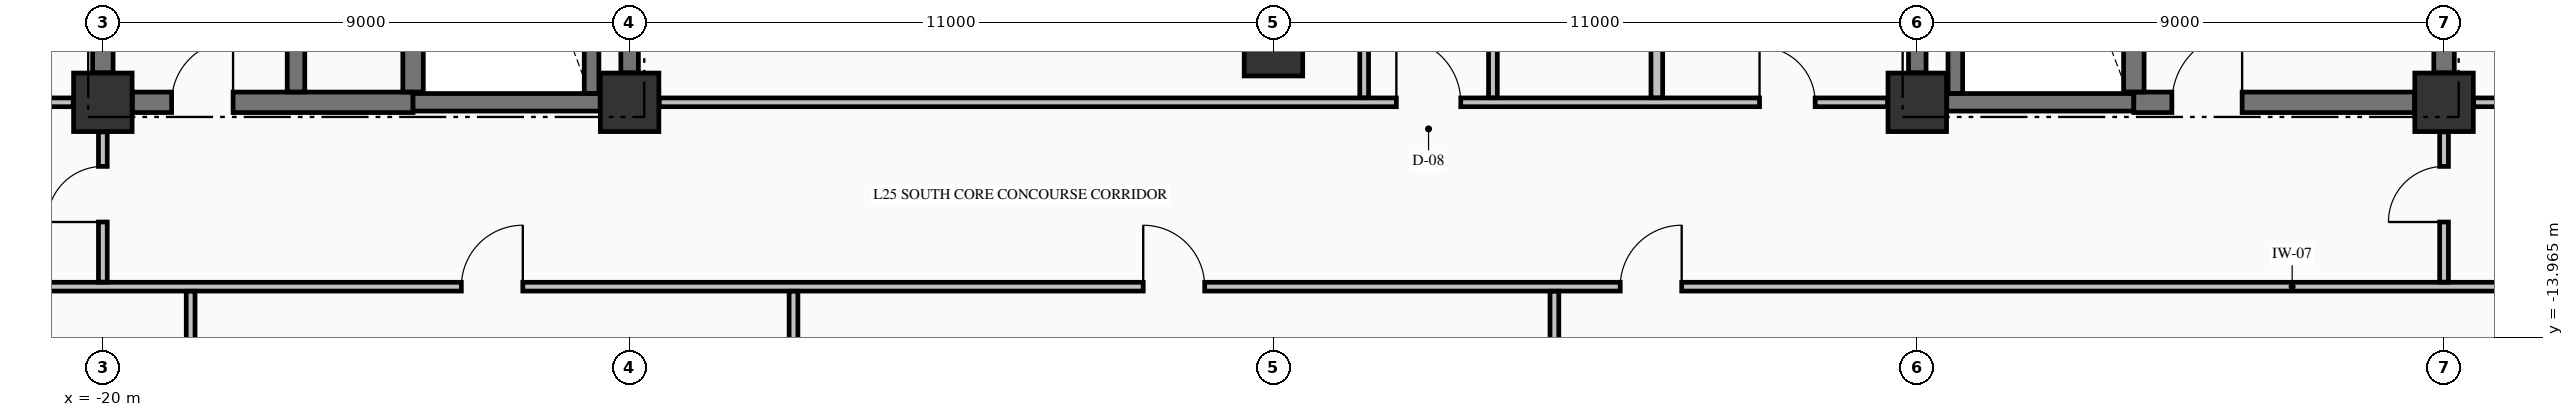
"""IFC4 building model, lengths in metres.
Left out: names, types, materials, properties, quantities, classifications, styles, units other than length and angle.
Written with IfcOpenShell. Run it as: python <this file> out.ifc"""

import sys

from ifc_helpers import new_model, si_unit, direction, frame, frame_2d, origin, origin_2d, place, context, subcontext, project, spatial, rectangle, extrude, element, fill, save


model = new_model("IFC4")
c1 = context("Model", 3, precision=1e-05, world=origin(), true_north=direction((0.0, 1.0)))
c2 = subcontext(c1, "Body", "Model", "MODEL_VIEW")
j1 = project(units=[si_unit("LENGTHUNIT", "METRE"), si_unit("PLANEANGLEUNIT", "RADIAN")], contexts=[c1])
p1 = place(None, origin())
s1 = spatial("IfcSite", under=j1, at=p1, CompositionType="ELEMENT")
p2 = place(p1, origin())
s2 = spatial("IfcBuilding", under=s1, at=p2, CompositionType="ELEMENT")
p3 = place(p2, frame((0.0, 0.0, 102.07)))
s3 = spatial("IfcBuildingStorey", under=s2, at=p3, CompositionType="ELEMENT", Elevation=102.07)
for number, where, z_axis, x_axis in (
    (1, (-20.0, -9.95, -0.25), (0.0, 0.0, 1.0), (1.0, 0.0, 0.0)),
    (2, (-11.0, -9.95, -0.25), (0.0, 0.0, 1.0), (1.0, 0.0, 0.0)),
    (3, (11.0, -9.95, -0.25), (0.0, 0.0, 1.0), (1.0, 0.0, 0.0)),
    (4, (20.0, -9.95, -0.25), (0.0, 0.0, 1.0), (1.0, 0.0, 0.0)),
    (5, (0.0, -9.0, -0.25), (0.0, 0.0, 1.0), (1.0, 0.0, 0.0)),
):
    element("IfcColumn", number, at=place(p3, frame(where, z_axis=z_axis, x_axis=x_axis)), inside=s3, PredefinedType="COLUMN", context=c2, shape_type="SweptSolid", body=[
        extrude(rectangle(XDim=1.0, YDim=1.0, at=origin_2d()), origin(), (0.0, 0.0, 1.0), 3.57),
    ])
p4 = place(p3, frame((-19.496, -9.95, 0.0), z_axis=(0.0, 0.0, 1.0), x_axis=(1.0, 0.0, 0.0)))
e6 = element("IfcWall", 6, at=p4, inside=s3, PredefinedType="SHEAR", context=c2, shape_type="SweptSolid", body=[
    extrude(rectangle(XDim=4.796, YDim=0.35, at=frame_2d((2.398, 0.0))), origin(), (0.0, 0.0, 1.0), 3.32),
])
p5 = place(p4, frame((0.671, 0.0, 0.0)))
e7 = element("IfcOpeningElement", 7, at=p5, cuts=e6, PredefinedType="OPENING", context=c2, shape_type="SweptSolid", body=[
    extrude(rectangle(XDim=1.05, YDim=2.15, at=frame_2d((0.525, 1.075))), frame((0.0, 0.185, 0.0), z_axis=(0.0, -1.0, 0.0), x_axis=(1.0, 0.0, 0.0)), (0.0, 0.0, 1.0), 0.37),
])
for number, where, z_axis, x_axis in (
    (8, (-14.7, -9.95, 0.0), (0.0, 0.0, 1.0), (1.0, 0.0, 0.0)),
    (9, (11.504, -9.95, 0.0), (0.0, 0.0, 1.0), (1.0, 0.0, 0.0)),
):
    element("IfcWall", number, at=place(p3, frame(where, z_axis=z_axis, x_axis=x_axis)), inside=s3, PredefinedType="SHEAR", context=c2, shape_type="SweptSolid", body=[
        extrude(rectangle(XDim=3.196, YDim=0.3, at=frame_2d((1.598, 0.0))), origin(), (0.0, 0.0, 1.0), 3.32),
    ])
p6 = place(p3, frame((14.7, -9.95, 0.0), z_axis=(0.0, 0.0, 1.0), x_axis=(1.0, 0.0, 0.0)))
e10 = element("IfcWall", 10, at=p6, inside=s3, PredefinedType="SHEAR", context=c2, shape_type="SweptSolid", body=[
    extrude(rectangle(XDim=4.796, YDim=0.35, at=frame_2d((2.398, 0.0))), origin(), (0.0, 0.0, 1.0), 3.32),
])
p7 = place(p6, frame((0.65, 0.0, 0.0)))
e11 = element("IfcOpeningElement", 11, at=p7, cuts=e10, PredefinedType="OPENING", context=c2, shape_type="SweptSolid", body=[
    extrude(rectangle(XDim=1.2, YDim=2.15, at=frame_2d((0.6, 1.075))), frame((0.0, 0.185, 0.0), z_axis=(0.0, -1.0, 0.0), x_axis=(1.0, 0.0, 0.0)), (0.0, 0.0, 1.0), 0.37),
])
p8 = place(p3, frame((-22.835, -13.1, 0.0), z_axis=(0.0, 0.0, 1.0), x_axis=(1.0, 0.0, 0.0)))
e12 = element("IfcWall", 12, at=p8, inside=s3, PredefinedType="PARTITIONING", context=c2, shape_type="SweptSolid", body=[
    extrude(rectangle(XDim=50.67, YDim=0.15, at=frame_2d((25.335, 0.0))), origin(), (0.0, 0.0, 1.0), 3.32),
])
p9 = place(p8, frame((8.96, 0.0, 0.0)))
e13 = element("IfcOpeningElement", 13, at=p9, cuts=e12, PredefinedType="OPENING", context=c2, shape_type="SweptSolid", body=[
    extrude(rectangle(XDim=1.05, YDim=2.15, at=frame_2d((0.525, 1.075))), frame((0.0, 0.085, 0.0), z_axis=(0.0, -1.0, 0.0), x_axis=(1.0, 0.0, 0.0)), (0.0, 0.0, 1.0), 0.17),
])
p10 = place(p8, frame((20.61, 0.0, 0.0)))
e14 = element("IfcOpeningElement", 14, at=p10, cuts=e12, PredefinedType="OPENING", context=c2, shape_type="SweptSolid", body=[
    extrude(rectangle(XDim=1.05, YDim=2.15, at=frame_2d((0.525, 1.075))), frame((0.0, 0.085, 0.0), z_axis=(0.0, -1.0, 0.0), x_axis=(1.0, 0.0, 0.0)), (0.0, 0.0, 1.0), 0.17),
])
p11 = place(p8, frame((28.76, 0.0, 0.0)))
e15 = element("IfcOpeningElement", 15, at=p11, cuts=e12, PredefinedType="OPENING", context=c2, shape_type="SweptSolid", body=[
    extrude(rectangle(XDim=1.05, YDim=2.15, at=frame_2d((0.525, 1.075))), frame((0.0, 0.085, 0.0), z_axis=(0.0, -1.0, 0.0), x_axis=(1.0, 0.0, 0.0)), (0.0, 0.0, 1.0), 0.17),
])
p12 = place(p3, frame((-22.835, -9.95, 0.0), z_axis=(0.0, 0.0, 1.0), x_axis=(1.0, 0.0, 0.0)))
e16 = element("IfcWall", 16, at=p12, inside=s3, PredefinedType="PARTITIONING", context=c2, shape_type="SweptSolid", body=[
    extrude(rectangle(XDim=2.329, YDim=0.15, at=frame_2d((1.165, 0.0))), origin(), (0.0, 0.0, 1.0), 3.32),
])
p13 = place(p12, frame((0.835, 0.0, 0.0)))
e17 = element("IfcOpeningElement", 17, at=p13, cuts=e16, PredefinedType="OPENING", context=c2, shape_type="SweptSolid", body=[
    extrude(rectangle(XDim=1.0, YDim=2.15, at=frame_2d((0.5, 1.075))), frame((0.0, 0.085, 0.0), z_axis=(0.0, -1.0, 0.0), x_axis=(1.0, 0.0, 0.0)), (0.0, 0.0, 1.0), 0.17),
])
p14 = place(p3, frame((-10.494, -9.95, 0.0), z_axis=(0.0, 0.0, 1.0), x_axis=(1.0, 0.0, 0.0)))
e18 = element("IfcWall", 18, at=p14, inside=s3, PredefinedType="PARTITIONING", context=c2, shape_type="SweptSolid", body=[
    extrude(rectangle(XDim=20.988, YDim=0.15, at=frame_2d((10.494, 0.0))), origin(), (0.0, 0.0, 1.0), 3.32),
])
p15 = place(p14, frame((12.594, 0.0, 0.0)))
e19 = element("IfcOpeningElement", 19, at=p15, cuts=e18, PredefinedType="OPENING", context=c2, shape_type="SweptSolid", body=[
    extrude(rectangle(XDim=1.1, YDim=2.15, at=frame_2d((0.55, 1.075))), frame((0.0, 0.085, 0.0), z_axis=(0.0, -1.0, 0.0), x_axis=(1.0, 0.0, 0.0)), (0.0, 0.0, 1.0), 0.17),
])
p16 = place(p14, frame((18.799, 0.0, 0.0)))
e20 = element("IfcOpeningElement", 20, at=p16, cuts=e18, PredefinedType="OPENING", context=c2, shape_type="SweptSolid", body=[
    extrude(rectangle(XDim=0.95, YDim=2.15, at=frame_2d((0.475, 1.075))), frame((0.0, 0.085, 0.0), z_axis=(0.0, -1.0, 0.0), x_axis=(1.0, 0.0, 0.0)), (0.0, 0.0, 1.0), 0.17),
])
p17 = place(p3, frame((20.506, -9.95, 0.0), z_axis=(0.0, 0.0, 1.0), x_axis=(1.0, 0.0, 0.0)))
e21 = element("IfcWall", 21, at=p17, inside=s3, PredefinedType="PARTITIONING", context=c2, shape_type="SweptSolid", body=[
    extrude(rectangle(XDim=7.329, YDim=0.15, at=frame_2d((3.665, 0.0))), origin(), (0.0, 0.0, 1.0), 3.32),
])
p18 = place(p17, frame((3.019, 0.0, 0.0)))
e22 = element("IfcOpeningElement", 22, at=p18, cuts=e21, PredefinedType="OPENING", context=c2, shape_type="SweptSolid", body=[
    extrude(rectangle(XDim=0.95, YDim=2.15, at=frame_2d((0.475, 1.075))), frame((0.0, 0.085, 0.0), z_axis=(0.0, -1.0, 0.0), x_axis=(1.0, 0.0, 0.0)), (0.0, 0.0, 1.0), 0.17),
])
p19 = place(p3, frame((-20.0, -9.446, 0.0), z_axis=(0.0, 0.0, 1.0), x_axis=(0.0, 1.0, 0.0)))
e23 = element("IfcWall", 23, at=p19, inside=s3, PredefinedType="SHEAR", context=c2, shape_type="SweptSolid", body=[
    extrude(rectangle(XDim=8.942, YDim=0.35, at=frame_2d((4.471, 0.0))), origin(), (0.0, 0.0, 1.0), 3.32),
])
p20 = place(p3, frame((-16.7, -9.773, 0.0), z_axis=(0.0, 0.0, 1.0), x_axis=(0.0, 1.0, 0.0)))
e24 = element("IfcWall", 24, at=p20, inside=s3, PredefinedType="SHEAR", context=c2, shape_type="SweptSolid", body=[
    extrude(rectangle(XDim=9.371, YDim=0.3, at=frame_2d((4.686, 0.0))), origin(), (0.0, 0.0, 1.0), 3.32),
])
p21 = place(p3, frame((-14.7, -9.773, 0.0), z_axis=(0.0, 0.0, 1.0), x_axis=(0.0, 1.0, 0.0)))
e25 = element("IfcWall", 25, at=p21, inside=s3, PredefinedType="SHEAR", context=c2, shape_type="SweptSolid", body=[
    extrude(rectangle(XDim=9.371, YDim=0.35, at=frame_2d((4.686, 0.0))), origin(), (0.0, 0.0, 1.0), 3.32),
])
p22 = place(p3, frame((-11.65, -9.798, 0.0), z_axis=(0.0, 0.0, 1.0), x_axis=(0.0, 1.0, 0.0)))
e26 = element("IfcWall", 26, at=p22, inside=s3, PredefinedType="SOLIDWALL", context=c2, shape_type="SweptSolid", body=[
    extrude(rectangle(XDim=9.396, YDim=0.25, at=frame_2d((4.698, 0.0))), origin(), (0.0, 0.0, 1.0), 3.32),
])
for number, where, z_axis, x_axis in (
    (27, (-11.0, -9.446, 0.0), (0.0, 0.0, 1.0), (0.0, 1.0, 0.0)),
    (28, (11.0, -9.446, 0.0), (0.0, 0.0, 1.0), (0.0, 1.0, 0.0)),
):
    element("IfcWall", number, at=place(p3, frame(where, z_axis=z_axis, x_axis=x_axis)), inside=s3, PredefinedType="SHEAR", context=c2, shape_type="SweptSolid", body=[
        extrude(rectangle(XDim=8.942, YDim=0.3, at=frame_2d((4.471, 0.0))), origin(), (0.0, 0.0, 1.0), 3.32),
    ])
p23 = place(p3, frame((11.65, -9.798, 0.0), z_axis=(0.0, 0.0, 1.0), x_axis=(0.0, 1.0, 0.0)))
e29 = element("IfcWall", 29, at=p23, inside=s3, PredefinedType="SOLIDWALL", context=c2, shape_type="SweptSolid", body=[
    extrude(rectangle(XDim=9.396, YDim=0.25, at=frame_2d((4.698, 0.0))), origin(), (0.0, 0.0, 1.0), 3.32),
])
p24 = place(p3, frame((14.7, -9.773, 0.0), z_axis=(0.0, 0.0, 1.0), x_axis=(0.0, 1.0, 0.0)))
e30 = element("IfcWall", 30, at=p24, inside=s3, PredefinedType="SHEAR", context=c2, shape_type="SweptSolid", body=[
    extrude(rectangle(XDim=9.371, YDim=0.35, at=frame_2d((4.686, 0.0))), origin(), (0.0, 0.0, 1.0), 3.32),
])
p25 = place(p3, frame((20.0, -9.446, 0.0), z_axis=(0.0, 0.0, 1.0), x_axis=(0.0, 1.0, 0.0)))
e31 = element("IfcWall", 31, at=p25, inside=s3, PredefinedType="SHEAR", context=c2, shape_type="SweptSolid", body=[
    extrude(rectangle(XDim=2.269, YDim=0.35, at=frame_2d((1.135, 0.0))), origin(), (0.0, 0.0, 1.0), 3.32),
])
p26 = place(p3, frame((-20.0, -13.022, 0.0), z_axis=(0.0, 0.0, 1.0), x_axis=(0.0, 1.0, 0.0)))
e32 = element("IfcWall", 32, at=p26, inside=s3, PredefinedType="PARTITIONING", context=c2, shape_type="SweptSolid", body=[
    extrude(rectangle(XDim=2.566, YDim=0.15, at=frame_2d((1.283, 0.0))), origin(), (0.0, 0.0, 1.0), 2.81),
])
p27 = place(p26, frame((1.027, 0.0, 0.0)))
e33 = element("IfcOpeningElement", 33, at=p27, cuts=e32, PredefinedType="OPENING", context=c2, shape_type="SweptSolid", body=[
    extrude(rectangle(XDim=0.95, YDim=2.15, at=frame_2d((0.475, 1.075))), frame((0.0, 0.085, 0.0), z_axis=(0.0, -1.0, 0.0), x_axis=(1.0, 0.0, 0.0)), (0.0, 0.0, 1.0), 0.17),
])
p28 = place(p3, frame((-18.5, -20.394, 0.0), z_axis=(0.0, 0.0, 1.0), x_axis=(0.0, 1.0, 0.0)))
e34 = element("IfcWall", 34, at=p28, inside=s3, PredefinedType="PARTITIONING", context=c2, shape_type="SweptSolid", body=[
    extrude(rectangle(XDim=7.216, YDim=0.15, at=frame_2d((3.608, 0.0))), origin(), (0.0, 0.0, 1.0), 3.32),
])
p29 = place(p3, frame((-8.2, -25.335, 0.0), z_axis=(0.0, 0.0, 1.0), x_axis=(0.0, 1.0, 0.0)))
e35 = element("IfcWall", 35, at=p29, inside=s3, PredefinedType="PARTITIONING", context=c2, shape_type="SweptSolid", body=[
    extrude(rectangle(XDim=12.157, YDim=0.15, at=frame_2d((6.079, 0.0))), origin(), (0.0, 0.0, 1.0), 3.32),
])
p30 = place(p3, frame((1.55, -9.872, 0.0), z_axis=(0.0, 0.0, 1.0), x_axis=(0.0, 1.0, 0.0)))
e36 = element("IfcWall", 36, at=p30, inside=s3, PredefinedType="PARTITIONING", context=c2, shape_type="SweptSolid", body=[
    extrude(rectangle(XDim=9.544, YDim=0.15, at=frame_2d((4.772, 0.0))), origin(), (0.0, 0.0, 1.0), 3.32),
])
p31 = place(p3, frame((3.75, -9.872, 0.0), z_axis=(0.0, 0.0, 1.0), x_axis=(0.0, 1.0, 0.0)))
e37 = element("IfcWall", 37, at=p31, inside=s3, PredefinedType="PARTITIONING", context=c2, shape_type="SweptSolid", body=[
    extrude(rectangle(XDim=5.519, YDim=0.15, at=frame_2d((2.76, 0.0))), origin(), (0.0, 0.0, 1.0), 3.32),
])
p32 = place(p31, frame((1.997, 0.0, 0.0)))
e38 = element("IfcOpeningElement", 38, at=p32, cuts=e37, PredefinedType="OPENING", context=c2, shape_type="SweptSolid", body=[
    extrude(rectangle(XDim=0.95, YDim=2.15, at=frame_2d((0.475, 1.075))), frame((0.0, 0.085, 0.0), z_axis=(0.0, -1.0, 0.0), x_axis=(1.0, 0.0, 0.0)), (0.0, 0.0, 1.0), 0.17),
])
p33 = place(p3, frame((4.8, -25.335, 0.0), z_axis=(0.0, 0.0, 1.0), x_axis=(0.0, 1.0, 0.0)))
e39 = element("IfcWall", 39, at=p33, inside=s3, PredefinedType="PARTITIONING", context=c2, shape_type="SweptSolid", body=[
    extrude(rectangle(XDim=12.157, YDim=0.15, at=frame_2d((6.079, 0.0))), origin(), (0.0, 0.0, 1.0), 3.32),
])
p34 = place(p3, frame((6.55, -9.872, 0.0), z_axis=(0.0, 0.0, 1.0), x_axis=(0.0, 1.0, 0.0)))
e40 = element("IfcWall", 40, at=p34, inside=s3, PredefinedType="PARTITIONING", context=c2, shape_type="SweptSolid", body=[
    extrude(rectangle(XDim=5.519, YDim=0.2, at=frame_2d((2.76, 0.0))), origin(), (0.0, 0.0, 1.0), 3.32),
])
p35 = place(p3, frame((20.0, -13.022, 0.0), z_axis=(0.0, 0.0, 1.0), x_axis=(0.0, 1.0, 0.0)))
e41 = element("IfcWall", 41, at=p35, inside=s3, PredefinedType="PARTITIONING", context=c2, shape_type="SweptSolid", body=[
    extrude(rectangle(XDim=2.566, YDim=0.15, at=frame_2d((1.283, 0.0))), origin(), (0.0, 0.0, 1.0), 2.81),
])
p36 = place(p35, frame((1.027, 0.0, 0.0)))
e42 = element("IfcOpeningElement", 42, at=p36, cuts=e41, PredefinedType="OPENING", context=c2, shape_type="SweptSolid", body=[
    extrude(rectangle(XDim=0.95, YDim=2.15, at=frame_2d((0.475, 1.075))), frame((0.0, 0.085, 0.0), z_axis=(0.0, -1.0, 0.0), x_axis=(1.0, 0.0, 0.0)), (0.0, 0.0, 1.0), 0.17),
])
p37 = place(p5, origin())
e43 = element("IfcDoor", 43, at=p37, inside=s3, OperationType="SINGLE_SWING_RIGHT", PredefinedType="DOOR", context=c2, shape_type="SweptSolid", body=[
    extrude(rectangle(XDim=1.05, YDim=2.15, at=frame_2d((0.525, 1.075))), frame((0.0, 0.025, 0.0), z_axis=(0.0, -1.0, 0.0), x_axis=(1.0, 0.0, 0.0)), (0.0, 0.0, 1.0), 0.05),
])
fill(e7, e43)
p38 = place(p7, origin())
e44 = element("IfcDoor", 44, at=p38, inside=s3, OperationType="SINGLE_SWING_RIGHT", PredefinedType="DOOR", context=c2, shape_type="SweptSolid", body=[
    extrude(rectangle(XDim=1.2, YDim=2.15, at=frame_2d((0.6, 1.075))), frame((0.0, 0.025, 0.0), z_axis=(0.0, -1.0, 0.0), x_axis=(1.0, 0.0, 0.0)), (0.0, 0.0, 1.0), 0.05),
])
fill(e11, e44)
p39 = place(p15, origin())
e45 = element("IfcDoor", 45, at=p39, inside=s3, OperationType="SINGLE_SWING_LEFT", PredefinedType="DOOR", context=c2, shape_type="SweptSolid", body=[
    extrude(rectangle(XDim=1.1, YDim=2.15, at=frame_2d((0.55, 1.075))), frame((0.0, 0.025, 0.0), z_axis=(0.0, -1.0, 0.0), x_axis=(1.0, 0.0, 0.0)), (0.0, 0.0, 1.0), 0.05),
])
fill(e19, e45)
p40 = place(p9, origin())
e46 = element("IfcDoor", 46, at=p40, inside=s3, OperationType="SINGLE_SWING_RIGHT", PredefinedType="DOOR", context=c2, shape_type="SweptSolid", body=[
    extrude(rectangle(XDim=1.05, YDim=2.15, at=frame_2d((0.525, 1.075))), frame((0.0, 0.025, 0.0), z_axis=(0.0, -1.0, 0.0), x_axis=(1.0, 0.0, 0.0)), (0.0, 0.0, 1.0), 0.05),
])
fill(e13, e46)
p41 = place(p10, origin())
e47 = element("IfcDoor", 47, at=p41, inside=s3, OperationType="SINGLE_SWING_LEFT", PredefinedType="DOOR", context=c2, shape_type="SweptSolid", body=[
    extrude(rectangle(XDim=1.05, YDim=2.15, at=frame_2d((0.525, 1.075))), frame((0.0, 0.025, 0.0), z_axis=(0.0, -1.0, 0.0), x_axis=(1.0, 0.0, 0.0)), (0.0, 0.0, 1.0), 0.05),
])
fill(e14, e47)
p42 = place(p11, origin())
e48 = element("IfcDoor", 48, at=p42, inside=s3, OperationType="SINGLE_SWING_RIGHT", PredefinedType="DOOR", context=c2, shape_type="SweptSolid", body=[
    extrude(rectangle(XDim=1.05, YDim=2.15, at=frame_2d((0.525, 1.075))), frame((0.0, 0.025, 0.0), z_axis=(0.0, -1.0, 0.0), x_axis=(1.0, 0.0, 0.0)), (0.0, 0.0, 1.0), 0.05),
])
fill(e15, e48)
p43 = place(p16, origin())
e49 = element("IfcDoor", 49, at=p43, inside=s3, OperationType="SINGLE_SWING_LEFT", PredefinedType="DOOR", context=c2, shape_type="SweptSolid", body=[
    extrude(rectangle(XDim=0.95, YDim=2.15, at=frame_2d((0.475, 1.075))), frame((0.0, 0.025, 0.0), z_axis=(0.0, -1.0, 0.0), x_axis=(1.0, 0.0, 0.0)), (0.0, 0.0, 1.0), 0.05),
])
fill(e20, e49)
p44 = place(p27, origin())
e50 = element("IfcDoor", 50, at=p44, inside=s3, OperationType="SINGLE_SWING_LEFT", PredefinedType="DOOR", context=c2, shape_type="SweptSolid", body=[
    extrude(rectangle(XDim=0.95, YDim=2.15, at=frame_2d((0.475, 1.075))), frame((0.0, 0.025, 0.0), z_axis=(0.0, -1.0, 0.0), x_axis=(1.0, 0.0, 0.0)), (0.0, 0.0, 1.0), 0.05),
])
fill(e33, e50)
p45 = place(p36, origin())
e51 = element("IfcDoor", 51, at=p45, inside=s3, OperationType="SINGLE_SWING_LEFT", PredefinedType="DOOR", context=c2, shape_type="SweptSolid", body=[
    extrude(rectangle(XDim=0.95, YDim=2.15, at=frame_2d((0.475, 1.075))), frame((0.0, 0.025, 0.0), z_axis=(0.0, -1.0, 0.0), x_axis=(1.0, 0.0, 0.0)), (0.0, 0.0, 1.0), 0.05),
])
fill(e42, e51)
save(model, sys.argv[1])
